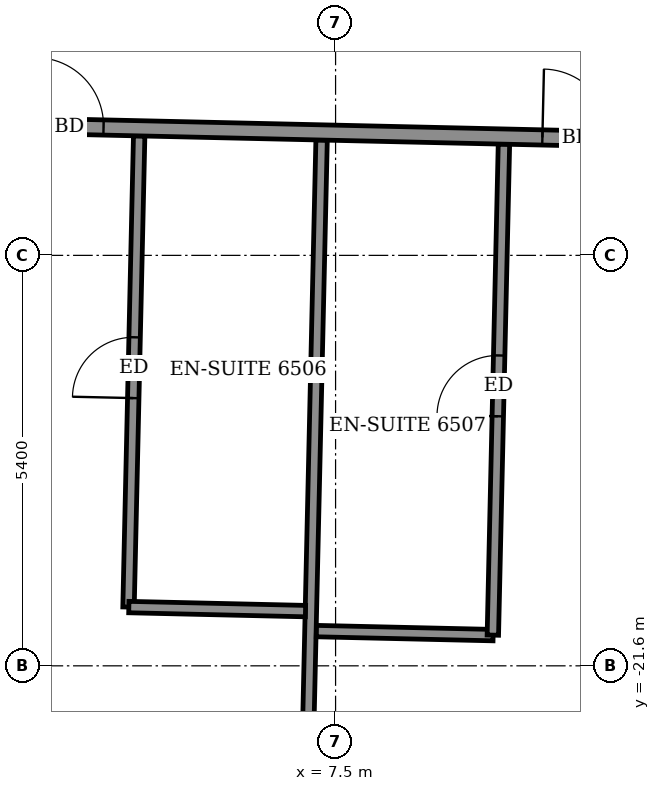
"""IFC4 building model, lengths in metres.
Left out: names, types, materials, properties, quantities, classifications, styles, units other than length and angle.
Written with IfcOpenShell. Run it as: python <this file> out.ifc"""

import sys

from ifc_helpers import new_model, si_unit, direction, frame, frame_2d, origin, place, context, subcontext, project, spatial, rectangle, extrude, element, fill, save


model = new_model("IFC4")
c1 = context("Model", 3, precision=1e-05, world=origin(), true_north=direction((0.0, 1.0)))
c2 = subcontext(c1, "Body", "Model", "MODEL_VIEW")
j1 = project(units=[si_unit("LENGTHUNIT", "METRE"), si_unit("PLANEANGLEUNIT", "RADIAN")], contexts=[c1])
p1 = place(None, origin())
s1 = spatial("IfcSite", under=j1, at=p1, CompositionType="ELEMENT")
p2 = place(p1, origin())
s2 = spatial("IfcBuilding", under=s1, at=p2, CompositionType="ELEMENT")
p3 = place(p2, frame((0.0, 0.0, 257.3)))
s3 = spatial("IfcBuildingStorey", under=s2, at=p3, CompositionType="ELEMENT", Elevation=257.3)
p4 = place(p3, frame((7.041, -26.78, 0.0), z_axis=(0.0, 0.0, 1.0), x_axis=(0.022719113715, 0.999741887625, 0.0)))
e1 = element("IfcWall", 1, at=p4, inside=s3, PredefinedType="PARTITIONING", context=c2, shape_type="SweptSolid", body=[
    extrude(rectangle(XDim=12.1, YDim=0.15, at=frame_2d((6.05, 0.0))), origin(), (0.0, 0.0, 1.0), 2.55),
])
p5 = place(p3, frame((7.248, -21.143, 0.0), z_axis=(0.0, 0.0, 1.0), x_axis=(0.999740478815, -0.022781023197, 0.0)))
e2 = element("IfcWall", 2, at=p5, inside=s3, PredefinedType="PARTITIONING", context=c2, shape_type="SweptSolid", body=[
    extrude(rectangle(XDim=2.325, YDim=0.15, at=frame_2d((1.163, 0.0))), origin(), (0.0, 0.0, 1.0), 3.05),
])
p6 = place(p3, frame((9.569, -21.196, 0.0), z_axis=(0.0, 0.0, 1.0), x_axis=(0.022597796078, 0.999744637201, 0.0)))
e3 = element("IfcWall", 3, at=p6, inside=s3, PredefinedType="PARTITIONING", context=c2, shape_type="SweptSolid", body=[
    extrude(rectangle(XDim=6.461, YDim=0.15, at=frame_2d((3.23, 0.0))), origin(), (0.0, 0.0, 1.0), 3.05),
])
p7 = place(p6, frame((2.88, 0.0, 0.0)))
e4 = element("IfcOpeningElement", 4, at=p7, cuts=e3, PredefinedType="OPENING", context=c2, shape_type="SweptSolid", body=[
    extrude(rectangle(XDim=0.8, YDim=2.1, at=frame_2d((0.4, 1.05))), frame((0.0, 0.085, 0.0), z_axis=(0.0, -1.0, 0.0), x_axis=(1.0, 0.0, 0.0)), (0.0, 0.0, 1.0), 0.17),
])
p8 = place(p3, frame((4.776, -20.827, 0.0), z_axis=(0.0, 0.0, 1.0), x_axis=(0.022604220207, 0.999744491972, 0.0)))
e5 = element("IfcWall", 5, at=p8, inside=s3, PredefinedType="PARTITIONING", context=c2, shape_type="SweptSolid", body=[
    extrude(rectangle(XDim=6.199, YDim=0.15, at=frame_2d((3.1, 0.0))), origin(), (0.0, 0.0, 1.0), 3.05),
])
p9 = place(p8, frame((2.75, 0.0, 0.0)))
e6 = element("IfcOpeningElement", 6, at=p9, cuts=e5, PredefinedType="OPENING", context=c2, shape_type="SweptSolid", body=[
    extrude(rectangle(XDim=0.8, YDim=2.1, at=frame_2d((0.4, 1.05))), frame((0.0, 0.085, 0.0), z_axis=(0.0, -1.0, 0.0), x_axis=(1.0, 0.0, 0.0)), (0.0, 0.0, 1.0), 0.17),
])
p10 = place(p3, frame((4.78, -20.827, 0.0), z_axis=(0.0, 0.0, 1.0), x_axis=(0.999740260747, -0.02279059109, 0.0)))
e7 = element("IfcWall", 7, at=p10, inside=s3, PredefinedType="PARTITIONING", context=c2, shape_type="SweptSolid", body=[
    extrude(rectangle(XDim=2.324, YDim=0.15, at=frame_2d((1.162, 0.0))), origin(), (0.0, 0.0, 1.0), 3.05),
])
p11 = place(p3, frame((-25.12, -13.847, 0.0), z_axis=(0.0, 0.0, 1.0), x_axis=(0.999742852445, -0.022676617578, 0.0)))
e8 = element("IfcWall", 8, at=p11, inside=s3, PredefinedType="PARTITIONING", context=c2, shape_type="SweptSolid", body=[
    extrude(rectangle(XDim=52.873, YDim=0.2, at=frame_2d((26.437, 0.0))), origin(), (0.0, 0.0, 1.0), 3.05),
])
p12 = place(p11, frame((0.725, 0.0, 0.0)))
e9 = element("IfcOpeningElement", 9, at=p12, cuts=e8, PredefinedType="OPENING", context=c2, shape_type="SweptSolid", body=[
    extrude(rectangle(XDim=1.0, YDim=2.1, at=frame_2d((0.5, 1.05))), frame((0.0, 0.11, 0.0), z_axis=(0.0, -1.0, 0.0), x_axis=(1.0, 0.0, 0.0)), (0.0, 0.0, 1.0), 0.22),
])
p13 = place(p11, frame((5.1, 0.0, 0.0)))
e10 = element("IfcOpeningElement", 10, at=p13, cuts=e8, PredefinedType="OPENING", context=c2, shape_type="SweptSolid", body=[
    extrude(rectangle(XDim=0.9, YDim=2.1, at=frame_2d((0.45, 1.05))), frame((0.0, 0.11, 0.0), z_axis=(0.0, -1.0, 0.0), x_axis=(1.0, 0.0, 0.0)), (0.0, 0.0, 1.0), 0.22),
])
p14 = place(p11, frame((9.6, 0.0, 0.0)))
e11 = element("IfcOpeningElement", 11, at=p14, cuts=e8, PredefinedType="OPENING", context=c2, shape_type="SweptSolid", body=[
    extrude(rectangle(XDim=0.9, YDim=2.1, at=frame_2d((0.45, 1.05))), frame((0.0, 0.11, 0.0), z_axis=(0.0, -1.0, 0.0), x_axis=(1.0, 0.0, 0.0)), (0.0, 0.0, 1.0), 0.22),
])
p15 = place(p11, frame((11.45, 0.0, 0.0)))
e12 = element("IfcOpeningElement", 12, at=p15, cuts=e8, PredefinedType="OPENING", context=c2, shape_type="SweptSolid", body=[
    extrude(rectangle(XDim=0.9, YDim=2.1, at=frame_2d((0.45, 1.05))), frame((0.0, 0.11, 0.0), z_axis=(0.0, -1.0, 0.0), x_axis=(1.0, 0.0, 0.0)), (0.0, 0.0, 1.0), 0.22),
])
p16 = place(p11, frame((18.15, 0.0, 0.0)))
e13 = element("IfcOpeningElement", 13, at=p16, cuts=e8, PredefinedType="OPENING", context=c2, shape_type="SweptSolid", body=[
    extrude(rectangle(XDim=0.9, YDim=2.1, at=frame_2d((0.45, 1.05))), frame((0.0, 0.11, 0.0), z_axis=(0.0, -1.0, 0.0), x_axis=(1.0, 0.0, 0.0)), (0.0, 0.0, 1.0), 0.22),
])
p17 = place(p11, frame((20.05, 0.0, 0.0)))
e14 = element("IfcOpeningElement", 14, at=p17, cuts=e8, PredefinedType="OPENING", context=c2, shape_type="SweptSolid", body=[
    extrude(rectangle(XDim=0.9, YDim=2.1, at=frame_2d((0.45, 1.05))), frame((0.0, 0.11, 0.0), z_axis=(0.0, -1.0, 0.0), x_axis=(1.0, 0.0, 0.0)), (0.0, 0.0, 1.0), 0.22),
])
p18 = place(p11, frame((26.775, 0.0, 0.0)))
e15 = element("IfcOpeningElement", 15, at=p18, cuts=e8, PredefinedType="OPENING", context=c2, shape_type="SweptSolid", body=[
    extrude(rectangle(XDim=0.9, YDim=2.1, at=frame_2d((0.45, 1.05))), frame((0.0, 0.11, 0.0), z_axis=(0.0, -1.0, 0.0), x_axis=(1.0, 0.0, 0.0)), (0.0, 0.0, 1.0), 0.22),
])
p19 = place(p11, frame((28.675, 0.0, 0.0)))
e16 = element("IfcOpeningElement", 16, at=p19, cuts=e8, PredefinedType="OPENING", context=c2, shape_type="SweptSolid", body=[
    extrude(rectangle(XDim=0.9, YDim=2.1, at=frame_2d((0.45, 1.05))), frame((0.0, 0.11, 0.0), z_axis=(0.0, -1.0, 0.0), x_axis=(1.0, 0.0, 0.0)), (0.0, 0.0, 1.0), 0.22),
])
p20 = place(p11, frame((35.35, 0.0, 0.0)))
e17 = element("IfcOpeningElement", 17, at=p20, cuts=e8, PredefinedType="OPENING", context=c2, shape_type="SweptSolid", body=[
    extrude(rectangle(XDim=0.9, YDim=2.1, at=frame_2d((0.45, 1.05))), frame((0.0, 0.11, 0.0), z_axis=(0.0, -1.0, 0.0), x_axis=(1.0, 0.0, 0.0)), (0.0, 0.0, 1.0), 0.22),
])
p21 = place(p11, frame((37.225, 0.0, 0.0)))
e18 = element("IfcOpeningElement", 18, at=p21, cuts=e8, PredefinedType="OPENING", context=c2, shape_type="SweptSolid", body=[
    extrude(rectangle(XDim=0.9, YDim=2.1, at=frame_2d((0.45, 1.05))), frame((0.0, 0.11, 0.0), z_axis=(0.0, -1.0, 0.0), x_axis=(1.0, 0.0, 0.0)), (0.0, 0.0, 1.0), 0.22),
])
p22 = place(p11, frame((43.85, 0.0, 0.0)))
e19 = element("IfcOpeningElement", 19, at=p22, cuts=e8, PredefinedType="OPENING", context=c2, shape_type="SweptSolid", body=[
    extrude(rectangle(XDim=0.9, YDim=2.1, at=frame_2d((0.45, 1.05))), frame((0.0, 0.11, 0.0), z_axis=(0.0, -1.0, 0.0), x_axis=(1.0, 0.0, 0.0)), (0.0, 0.0, 1.0), 0.22),
])
p23 = place(p11, frame((50.786, 0.0, 0.0)))
e20 = element("IfcOpeningElement", 20, at=p23, cuts=e8, PredefinedType="OPENING", context=c2, shape_type="SweptSolid", body=[
    extrude(rectangle(XDim=1.0, YDim=2.1, at=frame_2d((0.5, 1.05))), frame((0.0, 0.11, 0.0), z_axis=(0.0, -1.0, 0.0), x_axis=(1.0, 0.0, 0.0)), (0.0, 0.0, 1.0), 0.22),
])
p24 = place(p11, frame((46.05, 0.0, 0.0)))
e21 = element("IfcOpeningElement", 21, at=p24, cuts=e8, PredefinedType="OPENING", context=c2, shape_type="SweptSolid", body=[
    extrude(rectangle(XDim=0.9, YDim=2.1, at=frame_2d((0.45, 1.05))), frame((0.0, 0.11, 0.0), z_axis=(0.0, -1.0, 0.0), x_axis=(1.0, 0.0, 0.0)), (0.0, 0.0, 1.0), 0.22),
])
p25 = place(p19, origin())
e22 = element("IfcDoor", 22, at=p25, inside=s3, OperationType="SINGLE_SWING_RIGHT", PredefinedType="DOOR", context=c2, shape_type="SweptSolid", body=[
    extrude(rectangle(XDim=0.9, YDim=2.1, at=frame_2d((0.45, 1.05))), frame((0.0, 0.025, 0.0), z_axis=(0.0, -1.0, 0.0), x_axis=(1.0, 0.0, 0.0)), (0.0, 0.0, 1.0), 0.05),
])
fill(e16, e22)
p26 = place(p9, origin())
e23 = element("IfcDoor", 23, at=p26, inside=s3, OperationType="SINGLE_SWING_RIGHT", PredefinedType="DOOR", context=c2, shape_type="SweptSolid", body=[
    extrude(rectangle(XDim=0.8, YDim=2.1, at=frame_2d((0.4, 1.05))), frame((0.0, 0.025, 0.0), z_axis=(0.0, -1.0, 0.0), x_axis=(1.0, 0.0, 0.0)), (0.0, 0.0, 1.0), 0.05),
])
fill(e6, e23)
p27 = place(p20, origin())
e24 = element("IfcDoor", 24, at=p27, inside=s3, OperationType="SINGLE_SWING_LEFT", PredefinedType="DOOR", context=c2, shape_type="SweptSolid", body=[
    extrude(rectangle(XDim=0.9, YDim=2.1, at=frame_2d((0.45, 1.05))), frame((0.0, 0.025, 0.0), z_axis=(0.0, -1.0, 0.0), x_axis=(1.0, 0.0, 0.0)), (0.0, 0.0, 1.0), 0.05),
])
fill(e17, e24)
p28 = place(p7, origin())
e25 = element("IfcDoor", 25, at=p28, inside=s3, OperationType="SINGLE_SWING_LEFT", PredefinedType="DOOR", context=c2, shape_type="SweptSolid", body=[
    extrude(rectangle(XDim=0.8, YDim=2.1, at=frame_2d((0.4, 1.05))), frame((0.0, 0.025, 0.0), z_axis=(0.0, -1.0, 0.0), x_axis=(1.0, 0.0, 0.0)), (0.0, 0.0, 1.0), 0.05),
])
fill(e4, e25)
save(model, sys.argv[1])
